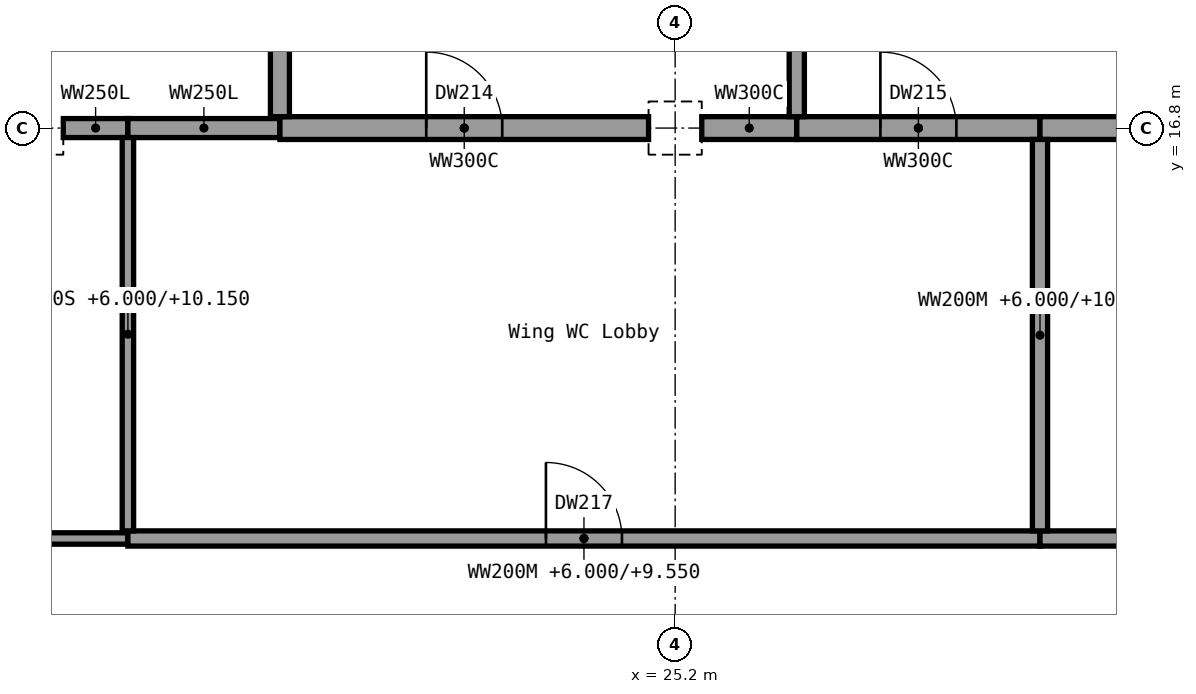
"""IFC4 building model, lengths in metres.
Left out: names, types, materials, properties, quantities, classifications, styles, units other than length and angle.
Written with IfcOpenShell. Run it as: python <this file> out.ifc"""

import sys

from ifc_helpers import new_model, si_unit, direction, frame, frame_2d, origin, origin_2d, place, context, subcontext, project, spatial, rectangle, extrude, element, fill, save


model = new_model("IFC4")
c1 = context("Model", 3, precision=1e-05, world=origin(), true_north=direction((0.0, 1.0)))
c2 = subcontext(c1, "Body", "Model", "MODEL_VIEW")
j1 = project(units=[si_unit("LENGTHUNIT", "METRE"), si_unit("PLANEANGLEUNIT", "RADIAN")], contexts=[c1])
p1 = place(None, origin())
s1 = spatial("IfcSite", under=j1, at=p1, CompositionType="ELEMENT")
p2 = place(p1, origin())
s2 = spatial("IfcBuilding", under=s1, at=p2, CompositionType="ELEMENT")
p3 = place(p2, frame((0.0, 0.0, 6.0)))
s3 = spatial("IfcBuildingStorey", under=s2, at=p3, CompositionType="ELEMENT", Elevation=6.0)
for number, where, z_axis, x_axis in (
    (1, (16.8, 16.8, 0.0), (0.0, 0.0, 1.0), (1.0, 0.0, 0.0)),
    (2, (25.2, 16.8, 0.0), (0.0, 0.0, 1.0), (1.0, 0.0, 0.0)),
):
    element("IfcColumn", number, at=place(p3, frame(where, z_axis=z_axis, x_axis=x_axis)), inside=s3, PredefinedType="COLUMN", context=c2, shape_type="SweptSolid", body=[
        extrude(rectangle(XDim=0.7, YDim=0.7, at=origin_2d()), origin(), (0.0, 0.0, 1.0), 4.5),
    ])
p4 = place(p3, frame((11.325, 11.4, 0.0), z_axis=(0.0, 0.0, 1.0), x_axis=(1.0, 0.0, 0.0)))
e3 = element("IfcWall", 3, at=p4, inside=s3, PredefinedType="PARTITIONING", context=c2, shape_type="SweptSolid", body=[
    extrude(rectangle(XDim=6.675, YDim=0.15, at=frame_2d((3.337, 0.0))), origin(), (0.0, 0.0, 1.0), 3.55),
])
p5 = place(p4, frame((2.837, 0.0, 0.0)))
e4 = element("IfcOpeningElement", 4, at=p5, cuts=e3, PredefinedType="OPENING", context=c2, shape_type="SweptSolid", body=[
    extrude(rectangle(XDim=1.0, YDim=2.1, at=frame_2d((0.5, 1.05))), frame((0.0, 0.075, 0.0), z_axis=(0.0, -1.0, 0.0), x_axis=(1.0, 0.0, 0.0)), (0.0, 0.0, 1.0), 0.15),
])
p6 = place(p3, frame((18.0, 11.4, 0.0), z_axis=(0.0, 0.0, 1.0), x_axis=(1.0, 0.0, 0.0)))
e5 = element("IfcWall", 5, at=p6, inside=s3, PredefinedType="PARTITIONING", context=c2, shape_type="SweptSolid", body=[
    extrude(rectangle(XDim=12.0, YDim=0.2, at=frame_2d((6.0, 0.0))), origin(), (0.0, 0.0, 1.0), 3.55),
])
p7 = place(p6, frame((5.5, 0.0, 0.0)))
e6 = element("IfcOpeningElement", 6, at=p7, cuts=e5, PredefinedType="OPENING", context=c2, shape_type="SweptSolid", body=[
    extrude(rectangle(XDim=1.0, YDim=2.1, at=frame_2d((0.5, 1.05))), frame((0.0, 0.1, 0.0), z_axis=(0.0, -1.0, 0.0), x_axis=(1.0, 0.0, 0.0)), (0.0, 0.0, 1.0), 0.2),
])
p8 = place(p3, frame((30.0, 11.4, 0.0), z_axis=(0.0, 0.0, 1.0), x_axis=(1.0, 0.0, 0.0)))
e7 = element("IfcWall", 7, at=p8, inside=s3, PredefinedType="PARTITIONING", context=c2, shape_type="SweptSolid", body=[
    extrude(rectangle(XDim=9.1, YDim=0.2, at=frame_2d((4.55, 0.0))), origin(), (0.0, 0.0, 1.0), 3.55),
])
p9 = place(p8, frame((4.05, 0.0, 0.0)))
e8 = element("IfcOpeningElement", 8, at=p9, cuts=e7, PredefinedType="OPENING", context=c2, shape_type="SweptSolid", body=[
    extrude(rectangle(XDim=1.0, YDim=2.1, at=frame_2d((0.5, 1.05))), frame((0.0, 0.1, 0.0), z_axis=(0.0, -1.0, 0.0), x_axis=(1.0, 0.0, 0.0)), (0.0, 0.0, 1.0), 0.2),
])
p10 = place(p3, frame((17.15, 16.8, 0.0), z_axis=(0.0, 0.0, 1.0), x_axis=(1.0, 0.0, 0.0)))
e9 = element("IfcWall", 9, at=p10, inside=s3, PredefinedType="SHEAR", context=c2, shape_type="SweptSolid", body=[
    extrude(rectangle(XDim=0.85, YDim=0.25, at=frame_2d((0.425, 0.0))), origin(), (0.0, 0.0, 1.0), 4.15),
])
p11 = place(p3, frame((18.0, 16.8, 0.0), z_axis=(0.0, 0.0, 1.0), x_axis=(1.0, 0.0, 0.0)))
e10 = element("IfcWall", 10, at=p11, inside=s3, PredefinedType="SHEAR", context=c2, shape_type="SweptSolid", body=[
    extrude(rectangle(XDim=2.0, YDim=0.25, at=frame_2d((1.0, 0.0))), origin(), (0.0, 0.0, 1.0), 4.15),
])
p12 = place(p3, frame((20.0, 16.8, 0.0), z_axis=(0.0, 0.0, 1.0), x_axis=(1.0, 0.0, 0.0)))
e11 = element("IfcWall", 11, at=p12, inside=s3, PredefinedType="SHEAR", context=c2, shape_type="SweptSolid", body=[
    extrude(rectangle(XDim=4.85, YDim=0.3, at=frame_2d((2.425, 0.0))), origin(), (0.0, 0.0, 1.0), 4.15),
])
p13 = place(p12, frame((1.925, 0.0, 0.0)))
e12 = element("IfcOpeningElement", 12, at=p13, cuts=e11, PredefinedType="OPENING", context=c2, shape_type="SweptSolid", body=[
    extrude(rectangle(XDim=1.0, YDim=2.1, at=frame_2d((0.5, 1.05))), frame((0.0, 0.15, 0.0), z_axis=(0.0, -1.0, 0.0), x_axis=(1.0, 0.0, 0.0)), (0.0, 0.0, 1.0), 0.3),
])
p14 = place(p3, frame((25.55, 16.8, 0.0), z_axis=(0.0, 0.0, 1.0), x_axis=(1.0, 0.0, 0.0)))
e13 = element("IfcWall", 13, at=p14, inside=s3, PredefinedType="SHEAR", context=c2, shape_type="SweptSolid", body=[
    extrude(rectangle(XDim=1.25, YDim=0.3, at=frame_2d((0.625, 0.0))), origin(), (0.0, 0.0, 1.0), 4.15),
])
p15 = place(p3, frame((26.8, 16.8, 0.0), z_axis=(0.0, 0.0, 1.0), x_axis=(1.0, 0.0, 0.0)))
e14 = element("IfcWall", 14, at=p15, inside=s3, PredefinedType="SHEAR", context=c2, shape_type="SweptSolid", body=[
    extrude(rectangle(XDim=3.2, YDim=0.3, at=frame_2d((1.6, 0.0))), origin(), (0.0, 0.0, 1.0), 4.15),
])
p16 = place(p15, frame((1.1, 0.0, 0.0)))
e15 = element("IfcOpeningElement", 15, at=p16, cuts=e14, PredefinedType="OPENING", context=c2, shape_type="SweptSolid", body=[
    extrude(rectangle(XDim=1.0, YDim=2.1, at=frame_2d((0.5, 1.05))), frame((0.0, 0.15, 0.0), z_axis=(0.0, -1.0, 0.0), x_axis=(1.0, 0.0, 0.0)), (0.0, 0.0, 1.0), 0.3),
])
p17 = place(p3, frame((30.0, 16.8, 0.0), z_axis=(0.0, 0.0, 1.0), x_axis=(1.0, 0.0, 0.0)))
e16 = element("IfcWall", 16, at=p17, inside=s3, PredefinedType="SHEAR", context=c2, shape_type="SweptSolid", body=[
    extrude(rectangle(XDim=3.25, YDim=0.3, at=frame_2d((1.625, 0.0))), origin(), (0.0, 0.0, 1.0), 4.15),
])
p18 = place(p3, frame((18.0, 11.5, 0.0), z_axis=(0.0, 0.0, 1.0), x_axis=(0.0, 1.0, 0.0)))
e17 = element("IfcWall", 17, at=p18, inside=s3, PredefinedType="PARTITIONING", context=c2, shape_type="SweptSolid", body=[
    extrude(rectangle(XDim=5.175, YDim=0.15, at=frame_2d((2.587, 0.0))), origin(), (0.0, 0.0, 1.0), 4.15),
])
p19 = place(p3, frame((20.0, 16.95, 0.0), z_axis=(0.0, 0.0, 1.0), x_axis=(0.0, 1.0, 0.0)))
e18 = element("IfcWall", 18, at=p19, inside=s3, PredefinedType="SHEAR", context=c2, shape_type="SweptSolid", body=[
    extrude(rectangle(XDim=2.65, YDim=0.25, at=frame_2d((1.325, 0.0))), origin(), (0.0, 0.0, 1.0), 4.15),
])
p20 = place(p3, frame((26.8, 16.95, 0.0), z_axis=(0.0, 0.0, 1.0), x_axis=(0.0, 1.0, 0.0)))
e19 = element("IfcWall", 19, at=p20, inside=s3, PredefinedType="PARTITIONING", context=c2, shape_type="SweptSolid", body=[
    extrude(rectangle(XDim=7.55, YDim=0.2, at=frame_2d((3.775, 0.0))), origin(), (0.0, 0.0, 1.0), 4.15),
])
p21 = place(p3, frame((30.0, 11.5, 0.0), z_axis=(0.0, 0.0, 1.0), x_axis=(0.0, 1.0, 0.0)))
e20 = element("IfcWall", 20, at=p21, inside=s3, PredefinedType="PARTITIONING", context=c2, shape_type="SweptSolid", body=[
    extrude(rectangle(XDim=5.15, YDim=0.2, at=frame_2d((2.575, 0.0))), origin(), (0.0, 0.0, 1.0), 4.15),
])
p22 = place(p13, origin())
e21 = element("IfcDoor", 21, at=p22, inside=s3, OperationType="SINGLE_SWING_LEFT", PredefinedType="DOOR", context=c2, shape_type="SweptSolid", body=[
    extrude(rectangle(XDim=1.0, YDim=2.1, at=frame_2d((0.5, 1.05))), frame((0.0, 0.025, 0.0), z_axis=(0.0, -1.0, 0.0), x_axis=(1.0, 0.0, 0.0)), (0.0, 0.0, 1.0), 0.05),
])
fill(e12, e21)
p23 = place(p16, origin())
e22 = element("IfcDoor", 22, at=p23, inside=s3, OperationType="SINGLE_SWING_LEFT", PredefinedType="DOOR", context=c2, shape_type="SweptSolid", body=[
    extrude(rectangle(XDim=1.0, YDim=2.1, at=frame_2d((0.5, 1.05))), frame((0.0, 0.025, 0.0), z_axis=(0.0, -1.0, 0.0), x_axis=(1.0, 0.0, 0.0)), (0.0, 0.0, 1.0), 0.05),
])
fill(e15, e22)
p24 = place(p7, origin())
e23 = element("IfcDoor", 23, at=p24, inside=s3, OperationType="SINGLE_SWING_LEFT", PredefinedType="DOOR", context=c2, shape_type="SweptSolid", body=[
    extrude(rectangle(XDim=1.0, YDim=2.1, at=frame_2d((0.5, 1.05))), frame((0.0, 0.025, 0.0), z_axis=(0.0, -1.0, 0.0), x_axis=(1.0, 0.0, 0.0)), (0.0, 0.0, 1.0), 0.05),
])
fill(e6, e23)
save(model, sys.argv[1])
